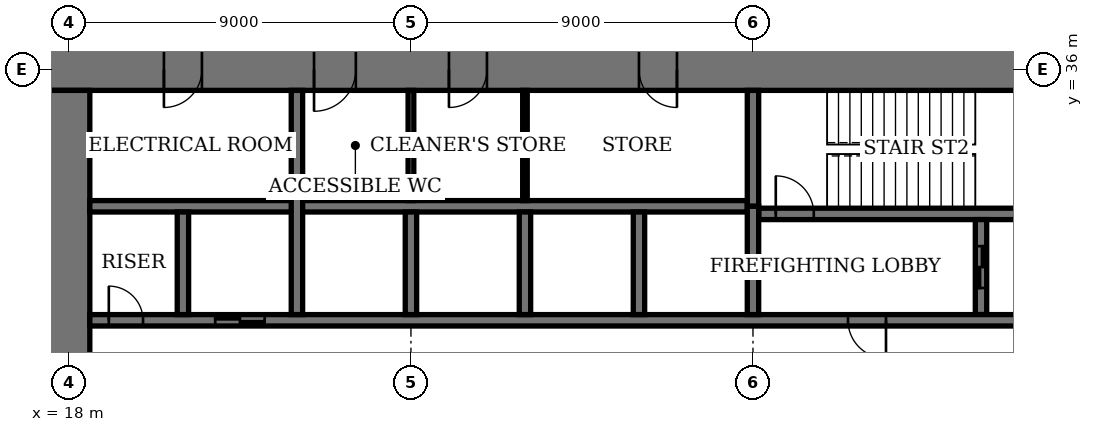
"""IFC4 building model, lengths in metres.
Left out: names, types, materials, properties, quantities, classifications, styles, units other than length and angle.
Written with IfcOpenShell. Run it as: python <this file> out.ifc"""

import sys

from ifc_helpers import new_model, si_unit, direction, frame, frame_2d, origin, place, context, subcontext, project, spatial, rectangle, extrude, element, fill, save


model = new_model("IFC4")
c1 = context("Model", 3, precision=1e-05, world=origin(), true_north=direction((0.0, 1.0)))
c2 = subcontext(c1, "Body", "Model", "MODEL_VIEW")
j1 = project(units=[si_unit("LENGTHUNIT", "METRE"), si_unit("PLANEANGLEUNIT", "RADIAN")], contexts=[c1])
p1 = place(None, origin())
s1 = spatial("IfcSite", under=j1, at=p1, CompositionType="ELEMENT")
p2 = place(p1, origin())
s2 = spatial("IfcBuilding", under=s1, at=p2, CompositionType="ELEMENT")
p3 = place(p2, frame((0.0, 0.0, 23.8)))
s3 = spatial("IfcBuildingStorey", under=s2, at=p3, CompositionType="ELEMENT", Elevation=23.8)
p4 = place(p3, frame((45.55, 36.0, 0.0), z_axis=(0.0, 0.0, 1.0), x_axis=(-1.0, 0.0, 0.0)))
e1 = element("IfcWall", 1, at=p4, inside=s3, PredefinedType="SHEAR", context=c2, shape_type="SweptSolid", body=[
    extrude(rectangle(XDim=28.1, YDim=1.1, at=frame_2d((14.05, 0.0))), origin(), (0.0, 0.0, 1.0), 4.0),
])
p5 = place(p4, frame((11.55, 0.0, 0.0)))
e2 = element("IfcOpeningElement", 2, at=p5, cuts=e1, PredefinedType="OPENING", context=c2, shape_type="SweptSolid", body=[
    extrude(rectangle(XDim=1.0, YDim=2.4, at=frame_2d((0.5, 1.2))), frame((0.0, 0.56, 0.0), z_axis=(0.0, -1.0, 0.0), x_axis=(1.0, 0.0, 0.0)), (0.0, 0.0, 1.0), 1.12),
])
p6 = place(p4, frame((16.55, 0.0, 0.0)))
e3 = element("IfcOpeningElement", 3, at=p6, cuts=e1, PredefinedType="OPENING", context=c2, shape_type="SweptSolid", body=[
    extrude(rectangle(XDim=1.0, YDim=2.4, at=frame_2d((0.5, 1.2))), frame((0.0, 0.56, 0.0), z_axis=(0.0, -1.0, 0.0), x_axis=(1.0, 0.0, 0.0)), (0.0, 0.0, 1.0), 1.12),
])
p7 = place(p4, frame((20.0, 0.0, 0.0)))
e4 = element("IfcOpeningElement", 4, at=p7, cuts=e1, PredefinedType="OPENING", context=c2, shape_type="SweptSolid", body=[
    extrude(rectangle(XDim=1.1, YDim=2.4, at=frame_2d((0.55, 1.2))), frame((0.0, 0.56, 0.0), z_axis=(0.0, -1.0, 0.0), x_axis=(1.0, 0.0, 0.0)), (0.0, 0.0, 1.0), 1.12),
])
p8 = place(p4, frame((24.05, 0.0, 0.0)))
e5 = element("IfcOpeningElement", 5, at=p8, cuts=e1, PredefinedType="OPENING", context=c2, shape_type="SweptSolid", body=[
    extrude(rectangle(XDim=1.0, YDim=2.4, at=frame_2d((0.5, 1.2))), frame((0.0, 0.56, 0.0), z_axis=(0.0, -1.0, 0.0), x_axis=(1.0, 0.0, 0.0)), (0.0, 0.0, 1.0), 1.12),
])
p9 = place(p3, frame((18.0, 35.45, 0.0), z_axis=(0.0, 0.0, 1.0), x_axis=(0.0, -1.0, 0.0)))
e6 = element("IfcWall", 6, at=p9, inside=s3, PredefinedType="SHEAR", context=c2, shape_type="SweptSolid", body=[
    extrude(rectangle(XDim=16.9, YDim=1.1, at=frame_2d((8.45, 0.0))), origin(), (0.0, 0.0, 1.0), 4.0),
])
p10 = place(p9, frame((8.45, 0.0, 0.0)))
e7 = element("IfcOpeningElement", 7, at=p10, cuts=e6, PredefinedType="OPENING", context=c2, shape_type="SweptSolid", body=[
    extrude(rectangle(XDim=1.8, YDim=2.4, at=frame_2d((0.9, 1.2))), frame((0.0, 0.56, 0.0), z_axis=(0.0, -1.0, 0.0), x_axis=(1.0, 0.0, 0.0)), (0.0, 0.0, 1.0), 1.12),
])
p11 = place(p3, frame((36.15, 32.2, 0.0), z_axis=(0.0, 0.0, 1.0), x_axis=(1.0, 0.0, 0.0)))
e8 = element("IfcWall", 8, at=p11, inside=s3, PredefinedType="SHEAR", context=c2, shape_type="SweptSolid", body=[
    extrude(rectangle(XDim=8.3, YDim=0.3, at=frame_2d((4.15, 0.0))), origin(), (0.0, 0.0, 1.0), 4.0),
])
p12 = place(p11, frame((0.45, 0.0, 0.0)))
e9 = element("IfcOpeningElement", 9, at=p12, cuts=e8, PredefinedType="OPENING", context=c2, shape_type="SweptSolid", body=[
    extrude(rectangle(XDim=1.0, YDim=2.4, at=frame_2d((0.5, 1.2))), frame((0.0, 0.16, 0.0), z_axis=(0.0, -1.0, 0.0), x_axis=(1.0, 0.0, 0.0)), (0.0, 0.0, 1.0), 0.32),
])
p13 = place(p3, frame((36.0, 32.4, 0.0), z_axis=(0.0, 0.0, 1.0), x_axis=(0.0, 1.0, 0.0)))
e10 = element("IfcWall", 10, at=p13, inside=s3, PredefinedType="SHEAR", context=c2, shape_type="SweptSolid", body=[
    extrude(rectangle(XDim=3.05, YDim=0.3, at=frame_2d((1.525, 0.0))), origin(), (0.0, 0.0, 1.0), 4.0),
])
p14 = place(p3, frame((42.0, 29.55, 0.0), z_axis=(0.0, 0.0, 1.0), x_axis=(0.0, 1.0, 0.0)))
e11 = element("IfcWall", 11, at=p14, inside=s3, PredefinedType="SHEAR", context=c2, shape_type="SweptSolid", body=[
    extrude(rectangle(XDim=2.5, YDim=0.3, at=frame_2d((1.25, 0.0))), origin(), (0.0, 0.0, 1.0), 4.0),
])
p15 = place(p14, frame((0.7, 0.0, 0.0)))
e12 = element("IfcOpeningElement", 12, at=p15, cuts=e11, PredefinedType="OPENING", context=c2, shape_type="SweptSolid", body=[
    extrude(rectangle(XDim=1.1, YDim=2.4, at=frame_2d((0.55, 1.2))), frame((0.0, 0.16, 0.0), z_axis=(0.0, -1.0, 0.0), x_axis=(1.0, 0.0, 0.0)), (0.0, 0.0, 1.0), 0.32),
])
p16 = place(p3, frame((18.55, 29.4, 0.0), z_axis=(0.0, 0.0, 1.0), x_axis=(1.0, 0.0, 0.0)))
e13 = element("IfcWall", 13, at=p16, inside=s3, PredefinedType="SHEAR", context=c2, shape_type="SweptSolid", body=[
    extrude(rectangle(XDim=25.9, YDim=0.3, at=frame_2d((12.95, 0.0))), origin(), (0.0, 0.0, 1.0), 4.0),
])
p17 = place(p16, frame((19.95, 0.0, 0.0)))
e14 = element("IfcOpeningElement", 14, at=p17, cuts=e13, PredefinedType="OPENING", context=c2, shape_type="SweptSolid", body=[
    extrude(rectangle(XDim=1.0, YDim=2.4, at=frame_2d((0.5, 1.2))), frame((0.0, 0.16, 0.0), z_axis=(0.0, -1.0, 0.0), x_axis=(1.0, 0.0, 0.0)), (0.0, 0.0, 1.0), 0.32),
])
p18 = place(p16, frame((0.5, 0.0, 0.0)))
e15 = element("IfcOpeningElement", 15, at=p18, cuts=e13, PredefinedType="OPENING", context=c2, shape_type="SweptSolid", body=[
    extrude(rectangle(XDim=0.9, YDim=2.1, at=frame_2d((0.45, 1.05))), frame((0.0, 0.16, 0.0), z_axis=(0.0, -1.0, 0.0), x_axis=(1.0, 0.0, 0.0)), (0.0, 0.0, 1.0), 0.32),
])
p19 = place(p16, frame((3.3, 0.0, 0.0)))
e16 = element("IfcOpeningElement", 16, at=p19, cuts=e13, PredefinedType="OPENING", context=c2, shape_type="SweptSolid", body=[
    extrude(rectangle(XDim=1.3, YDim=2.4, at=frame_2d((0.65, 1.2))), frame((0.0, 0.16, 0.0), z_axis=(0.0, -1.0, 0.0), x_axis=(1.0, 0.0, 0.0)), (0.0, 0.0, 1.0), 0.32),
])
p20 = place(p3, frame((18.55, 32.4, 0.0), z_axis=(0.0, 0.0, 1.0), x_axis=(1.0, 0.0, 0.0)))
e17 = element("IfcWall", 17, at=p20, inside=s3, PredefinedType="SHEAR", context=c2, shape_type="SweptSolid", body=[
    extrude(rectangle(XDim=17.3, YDim=0.3, at=frame_2d((8.65, 0.0))), origin(), (0.0, 0.0, 1.0), 4.0),
])
for number, where, z_axis, x_axis in (
    (18, (33.0, 29.55, 0.0), (0.0, 0.0, 1.0), (0.0, 1.0, 0.0)),
    (19, (30.0, 29.55, 0.0), (0.0, 0.0, 1.0), (0.0, 1.0, 0.0)),
    (20, (27.0, 29.55, 0.0), (0.0, 0.0, 1.0), (0.0, 1.0, 0.0)),
):
    element("IfcWall", number, at=place(p3, frame(where, z_axis=z_axis, x_axis=x_axis)), inside=s3, PredefinedType="SHEAR", context=c2, shape_type="SweptSolid", body=[
        extrude(rectangle(XDim=2.7, YDim=0.3, at=frame_2d((1.35, 0.0))), origin(), (0.0, 0.0, 1.0), 4.0),
    ])
p21 = place(p3, frame((24.0, 29.55, 0.0), z_axis=(0.0, 0.0, 1.0), x_axis=(0.0, 1.0, 0.0)))
e21 = element("IfcWall", 21, at=p21, inside=s3, PredefinedType="SHEAR", context=c2, shape_type="SweptSolid", body=[
    extrude(rectangle(XDim=5.9, YDim=0.3, at=frame_2d((2.95, 0.0))), origin(), (0.0, 0.0, 1.0), 4.0),
])
p22 = place(p3, frame((21.0, 29.55, 0.0), z_axis=(0.0, 0.0, 1.0), x_axis=(0.0, 1.0, 0.0)))
e22 = element("IfcWall", 22, at=p22, inside=s3, PredefinedType="SHEAR", context=c2, shape_type="SweptSolid", body=[
    extrude(rectangle(XDim=2.7, YDim=0.3, at=frame_2d((1.35, 0.0))), origin(), (0.0, 0.0, 1.0), 4.0),
])
p23 = place(p3, frame((36.0, 29.55, 0.0), z_axis=(0.0, 0.0, 1.0), x_axis=(0.0, 1.0, 0.0)))
e23 = element("IfcWall", 23, at=p23, inside=s3, PredefinedType="SHEAR", context=c2, shape_type="SweptSolid", body=[
    extrude(rectangle(XDim=2.85, YDim=0.3, at=frame_2d((1.425, 0.0))), origin(), (0.0, 0.0, 1.0), 4.0),
])
p24 = place(p3, frame((30.0, 32.55, 0.0), z_axis=(0.0, 0.0, 1.0), x_axis=(0.0, 1.0, 0.0)))
e24 = element("IfcWall", 24, at=p24, inside=s3, PredefinedType="PARTITIONING", context=c2, shape_type="SweptSolid", body=[
    extrude(rectangle(XDim=2.9, YDim=0.12, at=frame_2d((1.45, 0.0))), origin(), (0.0, 0.0, 1.0), 3.75),
])
p25 = place(p3, frame((27.0, 32.55, 0.0), z_axis=(0.0, 0.0, 1.0), x_axis=(0.0, 1.0, 0.0)))
e25 = element("IfcWall", 25, at=p25, inside=s3, PredefinedType="PARTITIONING", context=c2, shape_type="SweptSolid", body=[
    extrude(rectangle(XDim=2.9, YDim=0.15, at=frame_2d((1.45, 0.0))), origin(), (0.0, 0.0, 1.0), 3.75),
])
p26 = place(p5, origin())
e26 = element("IfcDoor", 26, at=p26, inside=s3, OperationType="SINGLE_SWING_RIGHT", PredefinedType="DOOR", context=c2, shape_type="SweptSolid", body=[
    extrude(rectangle(XDim=1.0, YDim=2.4, at=frame_2d((0.5, 1.2))), frame((0.0, 0.025, 0.0), z_axis=(0.0, -1.0, 0.0), x_axis=(1.0, 0.0, 0.0)), (0.0, 0.0, 1.0), 0.05),
    extrude(rectangle(XDim=0.04, YDim=2.4, at=frame_2d((0.02, 1.2))), frame((0.0, 0.4, 0.0), z_axis=(0.0, -1.0, 0.0), x_axis=(1.0, 0.0, 0.0)), (0.0, 0.0, 1.0), 0.8),
    extrude(rectangle(XDim=0.04, YDim=2.4, at=frame_2d((0.98, 1.2))), frame((0.0, 0.4, 0.0), z_axis=(0.0, -1.0, 0.0), x_axis=(1.0, 0.0, 0.0)), (0.0, 0.0, 1.0), 0.8),
    extrude(rectangle(XDim=1.0, YDim=0.04, at=frame_2d((0.5, 2.38))), frame((0.0, 0.4, 0.0), z_axis=(0.0, -1.0, 0.0), x_axis=(1.0, 0.0, 0.0)), (0.0, 0.0, 1.0), 0.8),
])
fill(e2, e26)
p27 = place(p6, origin())
e27 = element("IfcDoor", 27, at=p27, inside=s3, OperationType="SINGLE_SWING_LEFT", PredefinedType="DOOR", context=c2, shape_type="SweptSolid", body=[
    extrude(rectangle(XDim=1.0, YDim=2.4, at=frame_2d((0.5, 1.2))), frame((0.0, 0.025, 0.0), z_axis=(0.0, -1.0, 0.0), x_axis=(1.0, 0.0, 0.0)), (0.0, 0.0, 1.0), 0.05),
    extrude(rectangle(XDim=0.04, YDim=2.4, at=frame_2d((0.02, 1.2))), frame((0.0, 0.4, 0.0), z_axis=(0.0, -1.0, 0.0), x_axis=(1.0, 0.0, 0.0)), (0.0, 0.0, 1.0), 0.8),
    extrude(rectangle(XDim=0.04, YDim=2.4, at=frame_2d((0.98, 1.2))), frame((0.0, 0.4, 0.0), z_axis=(0.0, -1.0, 0.0), x_axis=(1.0, 0.0, 0.0)), (0.0, 0.0, 1.0), 0.8),
    extrude(rectangle(XDim=1.0, YDim=0.04, at=frame_2d((0.5, 2.38))), frame((0.0, 0.4, 0.0), z_axis=(0.0, -1.0, 0.0), x_axis=(1.0, 0.0, 0.0)), (0.0, 0.0, 1.0), 0.8),
])
fill(e3, e27)
p28 = place(p7, origin())
e28 = element("IfcDoor", 28, at=p28, inside=s3, OperationType="SINGLE_SWING_LEFT", PredefinedType="DOOR", context=c2, shape_type="SweptSolid", body=[
    extrude(rectangle(XDim=1.1, YDim=2.4, at=frame_2d((0.55, 1.2))), frame((0.0, 0.025, 0.0), z_axis=(0.0, -1.0, 0.0), x_axis=(1.0, 0.0, 0.0)), (0.0, 0.0, 1.0), 0.05),
    extrude(rectangle(XDim=0.04, YDim=2.4, at=frame_2d((0.02, 1.2))), frame((0.0, 0.44, 0.0), z_axis=(0.0, -1.0, 0.0), x_axis=(1.0, 0.0, 0.0)), (0.0, 0.0, 1.0), 0.88),
    extrude(rectangle(XDim=0.04, YDim=2.4, at=frame_2d((1.08, 1.2))), frame((0.0, 0.44, 0.0), z_axis=(0.0, -1.0, 0.0), x_axis=(1.0, 0.0, 0.0)), (0.0, 0.0, 1.0), 0.88),
    extrude(rectangle(XDim=1.1, YDim=0.04, at=frame_2d((0.55, 2.38))), frame((0.0, 0.44, 0.0), z_axis=(0.0, -1.0, 0.0), x_axis=(1.0, 0.0, 0.0)), (0.0, 0.0, 1.0), 0.88),
])
fill(e4, e28)
p29 = place(p8, origin())
e29 = element("IfcDoor", 29, at=p29, inside=s3, OperationType="SINGLE_SWING_LEFT", PredefinedType="DOOR", context=c2, shape_type="SweptSolid", body=[
    extrude(rectangle(XDim=1.0, YDim=2.4, at=frame_2d((0.5, 1.2))), frame((0.0, 0.025, 0.0), z_axis=(0.0, -1.0, 0.0), x_axis=(1.0, 0.0, 0.0)), (0.0, 0.0, 1.0), 0.05),
    extrude(rectangle(XDim=0.04, YDim=2.4, at=frame_2d((0.02, 1.2))), frame((0.0, 0.4, 0.0), z_axis=(0.0, -1.0, 0.0), x_axis=(1.0, 0.0, 0.0)), (0.0, 0.0, 1.0), 0.8),
    extrude(rectangle(XDim=0.04, YDim=2.4, at=frame_2d((0.98, 1.2))), frame((0.0, 0.4, 0.0), z_axis=(0.0, -1.0, 0.0), x_axis=(1.0, 0.0, 0.0)), (0.0, 0.0, 1.0), 0.8),
    extrude(rectangle(XDim=1.0, YDim=0.04, at=frame_2d((0.5, 2.38))), frame((0.0, 0.4, 0.0), z_axis=(0.0, -1.0, 0.0), x_axis=(1.0, 0.0, 0.0)), (0.0, 0.0, 1.0), 0.8),
])
fill(e5, e29)
p30 = place(p12, origin())
e30 = element("IfcDoor", 30, at=p30, inside=s3, OperationType="SINGLE_SWING_RIGHT", PredefinedType="DOOR", context=c2, shape_type="SweptSolid", body=[
    extrude(rectangle(XDim=1.0, YDim=2.4, at=frame_2d((0.5, 1.2))), frame((0.0, 0.03, 0.0), z_axis=(0.0, -1.0, 0.0), x_axis=(1.0, 0.0, 0.0)), (0.0, 0.0, 1.0), 0.06),
])
fill(e9, e30)
p31 = place(p17, origin())
e31 = element("IfcDoor", 31, at=p31, inside=s3, OperationType="SINGLE_SWING_RIGHT", PredefinedType="DOOR", context=c2, shape_type="SweptSolid", body=[
    extrude(rectangle(XDim=1.0, YDim=2.4, at=frame_2d((0.5, 1.2))), frame((0.0, 0.03, 0.0), z_axis=(0.0, -1.0, 0.0), x_axis=(1.0, 0.0, 0.0)), (0.0, 0.0, 1.0), 0.06),
])
fill(e14, e31)
p32 = place(p18, origin())
e32 = element("IfcDoor", 32, at=p32, inside=s3, OperationType="SINGLE_SWING_RIGHT", PredefinedType="DOOR", context=c2, shape_type="SweptSolid", body=[
    extrude(rectangle(XDim=0.9, YDim=2.1, at=frame_2d((0.45, 1.05))), frame((0.0, 0.03, 0.0), z_axis=(0.0, -1.0, 0.0), x_axis=(1.0, 0.0, 0.0)), (0.0, 0.0, 1.0), 0.06),
])
fill(e15, e32)
p33 = place(p19, origin())
e33 = element("IfcDoor", 33, at=p33, inside=s3, OperationType="DOUBLE_DOOR_SLIDING", PredefinedType="DOOR", context=c2, shape_type="SweptSolid", body=[
    extrude(rectangle(XDim=1.3, YDim=2.4, at=frame_2d((0.65, 1.2))), frame((0.0, 0.02, 0.0), z_axis=(0.0, -1.0, 0.0), x_axis=(1.0, 0.0, 0.0)), (0.0, 0.0, 1.0), 0.04),
])
fill(e16, e33)
p34 = place(p15, origin())
e34 = element("IfcDoor", 34, at=p34, inside=s3, OperationType="DOUBLE_DOOR_SLIDING", PredefinedType="DOOR", context=c2, shape_type="SweptSolid", body=[
    extrude(rectangle(XDim=1.1, YDim=2.4, at=frame_2d((0.55, 1.2))), frame((0.0, 0.03, 0.0), z_axis=(0.0, -1.0, 0.0), x_axis=(1.0, 0.0, 0.0)), (0.0, 0.0, 1.0), 0.06),
])
fill(e12, e34)
save(model, sys.argv[1])
